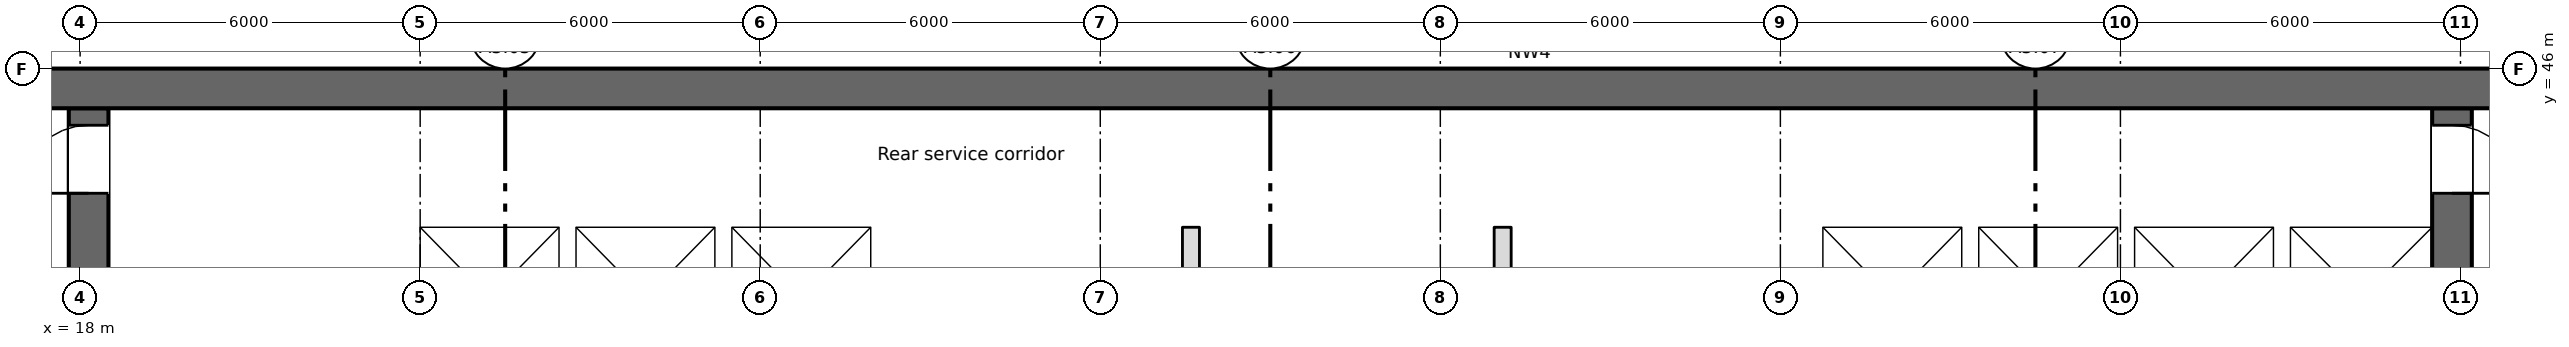
"""IFC4 building model, lengths in metres.
Left out: names, types, materials, properties, quantities, classifications, styles, units other than length and angle.
Written with IfcOpenShell. Run it as: python <this file> out.ifc"""

import sys

from ifc_helpers import new_model, si_unit, direction, frame, frame_2d, origin, place, context, subcontext, project, spatial, rectangle, extrude, element, fill, save


model = new_model("IFC4")
c1 = context("Model", 3, precision=1e-05, world=origin(), true_north=direction((0.0, 1.0)))
c2 = subcontext(c1, "Body", "Model", "MODEL_VIEW")
j1 = project(units=[si_unit("LENGTHUNIT", "METRE"), si_unit("PLANEANGLEUNIT", "RADIAN")], contexts=[c1])
p1 = place(None, origin())
s1 = spatial("IfcSite", under=j1, at=p1, CompositionType="ELEMENT")
p2 = place(p1, origin())
s2 = spatial("IfcBuilding", under=s1, at=p2, CompositionType="ELEMENT")
p3 = place(p2, frame((0.0, 0.0, 200.5)))
s3 = spatial("IfcBuildingStorey", under=s2, at=p3, CompositionType="ELEMENT", Elevation=200.5)
p4 = place(p3, frame((11.55, 45.65, 0.0), z_axis=(0.0, 0.0, 1.0), x_axis=(1.0, 0.0, 0.0)))
e1 = element("IfcWall", 1, at=p4, inside=s3, PredefinedType="SHEAR", context=c2, shape_type="SweptSolid", body=[
    extrude(rectangle(XDim=54.9, YDim=0.7, at=frame_2d((27.45, 0.0))), origin(), (0.0, 0.0, 1.0), 3.35),
])
p5 = place(p4, frame((1.2, 0.0, 0.6)))
e2 = element("IfcOpeningElement", 2, at=p5, cuts=e1, PredefinedType="OPENING", context=c2, shape_type="SweptSolid", body=[
    extrude(rectangle(XDim=0.6, YDim=2.4, at=frame_2d((0.3, 1.2))), frame((0.0, 0.36, 0.0), z_axis=(0.0, -1.0, 0.0), x_axis=(1.0, 0.0, 0.0)), (0.0, 0.0, 1.0), 0.72),
])
p6 = place(p3, frame((18.15, 28.4, 0.0), z_axis=(0.0, 0.0, 1.0), x_axis=(0.0, 1.0, 0.0)))
e3 = element("IfcWall", 3, at=p6, inside=s3, PredefinedType="SHEAR", context=c2, shape_type="SweptSolid", body=[
    extrude(rectangle(XDim=16.9, YDim=0.7, at=frame_2d((8.45, 0.0))), origin(), (0.0, 0.0, 1.0), 3.35),
])
p7 = place(p6, frame((9.6, 0.0, 0.0)))
e4 = element("IfcOpeningElement", 4, at=p7, cuts=e3, PredefinedType="OPENING", context=c2, shape_type="SweptSolid", body=[
    extrude(rectangle(XDim=2.0, YDim=2.1, at=frame_2d((1.0, 1.05))), frame((0.0, 0.36, 0.0), z_axis=(0.0, -1.0, 0.0), x_axis=(1.0, 0.0, 0.0)), (0.0, 0.0, 1.0), 0.72),
])
p8 = place(p6, frame((15.4, 0.0, 0.0)))
e5 = element("IfcOpeningElement", 5, at=p8, cuts=e3, PredefinedType="OPENING", context=c2, shape_type="SweptSolid", body=[
    extrude(rectangle(XDim=1.2, YDim=2.1, at=frame_2d((0.6, 1.05))), frame((0.0, 0.36, 0.0), z_axis=(0.0, -1.0, 0.0), x_axis=(1.0, 0.0, 0.0)), (0.0, 0.0, 1.0), 0.72),
])
p9 = place(p3, frame((59.85, 28.4, 0.0), z_axis=(0.0, 0.0, 1.0), x_axis=(0.0, 1.0, 0.0)))
e6 = element("IfcWall", 6, at=p9, inside=s3, PredefinedType="SHEAR", context=c2, shape_type="SweptSolid", body=[
    extrude(rectangle(XDim=16.9, YDim=0.7, at=frame_2d((8.45, 0.0))), origin(), (0.0, 0.0, 1.0), 3.35),
])
p10 = place(p9, frame((9.6, 0.0, 0.0)))
e7 = element("IfcOpeningElement", 7, at=p10, cuts=e6, PredefinedType="OPENING", context=c2, shape_type="SweptSolid", body=[
    extrude(rectangle(XDim=2.0, YDim=2.1, at=frame_2d((1.0, 1.05))), frame((0.0, 0.36, 0.0), z_axis=(0.0, -1.0, 0.0), x_axis=(1.0, 0.0, 0.0)), (0.0, 0.0, 1.0), 0.72),
])
p11 = place(p9, frame((15.4, 0.0, 0.0)))
e8 = element("IfcOpeningElement", 8, at=p11, cuts=e6, PredefinedType="OPENING", context=c2, shape_type="SweptSolid", body=[
    extrude(rectangle(XDim=1.2, YDim=2.1, at=frame_2d((0.6, 1.05))), frame((0.0, 0.36, 0.0), z_axis=(0.0, -1.0, 0.0), x_axis=(1.0, 0.0, 0.0)), (0.0, 0.0, 1.0), 0.72),
])
p12 = place(p3, frame((18.5, 43.35, 0.0), z_axis=(0.0, 0.0, 1.0), x_axis=(1.0, 0.0, 0.0)))
e9 = element("IfcWall", 9, at=p12, inside=s3, PredefinedType="SHEAR", context=c2, shape_type="SweptSolid", body=[
    extrude(rectangle(XDim=41.0, YDim=0.3, at=frame_2d((20.5, 0.0))), origin(), (0.0, 0.0, 1.0), 3.35),
])
for number, where, z_axis, x_axis in (
    (10, (23.85, 40.7, 0.0), (0.0, 0.0, 1.0), (0.0, 1.0, 0.0)),
    (11, (26.6, 40.7, 0.0), (0.0, 0.0, 1.0), (0.0, 1.0, 0.0)),
    (12, (29.35, 40.7, 0.0), (0.0, 0.0, 1.0), (0.0, 1.0, 0.0)),
    (13, (32.1, 40.7, 0.0), (0.0, 0.0, 1.0), (0.0, 1.0, 0.0)),
    (14, (48.6, 40.7, 0.0), (0.0, 0.0, 1.0), (0.0, 1.0, 0.0)),
    (15, (51.35, 40.7, 0.0), (0.0, 0.0, 1.0), (0.0, 1.0, 0.0)),
    (16, (54.1, 40.7, 0.0), (0.0, 0.0, 1.0), (0.0, 1.0, 0.0)),
    (17, (56.85, 40.7, 0.0), (0.0, 0.0, 1.0), (0.0, 1.0, 0.0)),
):
    element("IfcWall", number, at=place(p3, frame(where, z_axis=z_axis, x_axis=x_axis)), inside=s3, PredefinedType="SHEAR", context=c2, shape_type="SweptSolid", body=[
        extrude(rectangle(XDim=2.5, YDim=0.3, at=frame_2d((1.25, 0.0))), origin(), (0.0, 0.0, 1.0), 3.35),
    ])
for number, where, z_axis, x_axis in (
    (18, (37.6, 40.7, 0.0), (0.0, 0.0, 1.0), (0.0, 1.0, 0.0)),
    (19, (43.1, 40.7, 0.0), (0.0, 0.0, 1.0), (0.0, 1.0, 0.0)),
):
    element("IfcWall", number, at=place(p3, frame(where, z_axis=z_axis, x_axis=x_axis)), inside=s3, PredefinedType="PARTITIONING", context=c2, shape_type="SweptSolid", body=[
        extrude(rectangle(XDim=2.5, YDim=0.3, at=frame_2d((1.25, 0.0))), origin(), (0.0, 0.0, 1.0), 3.35),
    ])
p13 = place(p8, origin())
e20 = element("IfcDoor", 20, at=p13, inside=s3, OperationType="SINGLE_SWING_LEFT", PredefinedType="DOOR", context=c2, shape_type="SweptSolid", body=[
    extrude(rectangle(XDim=1.2, YDim=2.1, at=frame_2d((0.6, 1.05))), frame((0.0, 0.025, 0.0), z_axis=(0.0, -1.0, 0.0), x_axis=(1.0, 0.0, 0.0)), (0.0, 0.0, 1.0), 0.05),
])
fill(e5, e20)
p14 = place(p11, origin())
e21 = element("IfcDoor", 21, at=p14, inside=s3, OperationType="SINGLE_SWING_LEFT", PredefinedType="DOOR", context=c2, shape_type="SweptSolid", body=[
    extrude(rectangle(XDim=1.2, YDim=2.1, at=frame_2d((0.6, 1.05))), frame((0.0, 0.025, 0.0), z_axis=(0.0, -1.0, 0.0), x_axis=(1.0, 0.0, 0.0)), (0.0, 0.0, 1.0), 0.05),
])
fill(e8, e21)
save(model, sys.argv[1])
